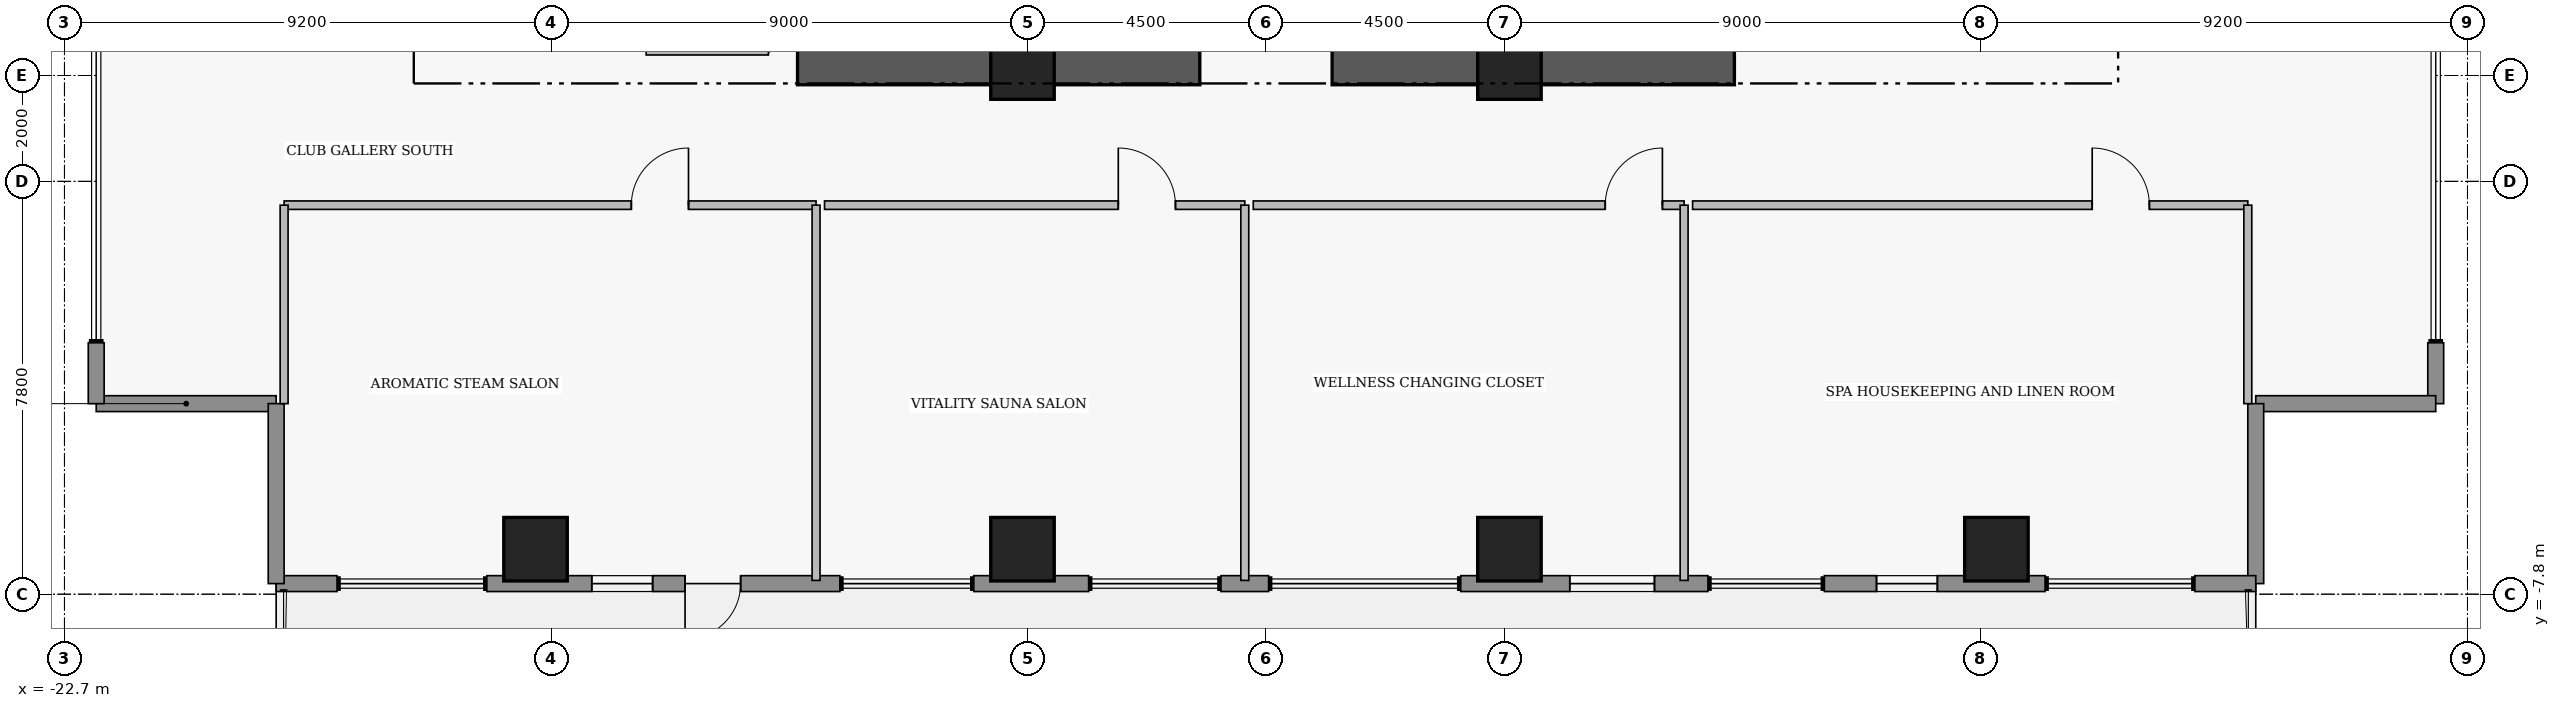
"""IFC4 building model, lengths in metres.
Left out: names, types, materials, properties, quantities, classifications, styles, units other than length and angle.
Written with IfcOpenShell. Run it as: python <this file> out.ifc"""

import sys

from ifc_helpers import new_model, si_unit, direction, frame, frame_2d, origin, origin_2d, place, context, subcontext, project, spatial, rectangle, extrude, element, fill, save


model = new_model("IFC4")
c1 = context("Model", 3, precision=1e-05, world=origin(), true_north=direction((0.0, 1.0)))
c2 = subcontext(c1, "Body", "Model", "MODEL_VIEW")
j1 = project(units=[si_unit("LENGTHUNIT", "METRE"), si_unit("PLANEANGLEUNIT", "RADIAN")], contexts=[c1])
p1 = place(None, origin())
s1 = spatial("IfcSite", under=j1, at=p1, CompositionType="ELEMENT")
p2 = place(p1, origin())
s2 = spatial("IfcBuilding", under=s1, at=p2, CompositionType="ELEMENT")
p3 = place(p2, frame((0.0, 0.0, 172.8)))
s3 = spatial("IfcBuildingStorey", under=s2, at=p3, CompositionType="ELEMENT", Elevation=172.8)
for number, where, z_axis, x_axis in (
    (1, (-8.85, 2.15, 0.0), (0.0, 0.0, 1.0), (1.0, 0.0, 0.0)),
    (2, (1.25, 2.15, 0.0), (0.0, 0.0, 1.0), (1.0, 0.0, 0.0)),
):
    element("IfcWall", number, at=place(p3, frame(where, z_axis=z_axis, x_axis=x_axis)), inside=s3, PredefinedType="SHEAR", context=c2, shape_type="SweptSolid", body=[
        extrude(rectangle(XDim=7.6, YDim=0.65, at=frame_2d((3.8, 0.0))), origin(), (0.0, 0.0, 1.0), 4.38),
    ])
for number, where, z_axis, x_axis in (
    (3, (-4.6, 2.15, 0.0), (0.0, 0.0, 1.0), (1.0, 0.0, 0.0)),
    (4, (4.6, 2.15, 0.0), (0.0, 0.0, 1.0), (1.0, 0.0, 0.0)),
    (5, (-13.8, -6.95, 0.0), (0.0, 0.0, 1.0), (1.0, 0.0, 0.0)),
    (6, (-4.6, -6.95, 0.0), (0.0, 0.0, 1.0), (1.0, 0.0, 0.0)),
    (7, (4.6, -6.95, 0.0), (0.0, 0.0, 1.0), (1.0, 0.0, 0.0)),
    (8, (13.8, -6.95, 0.0), (0.0, 0.0, 1.0), (1.0, 0.0, 0.0)),
):
    element("IfcColumn", number, at=place(p3, frame(where, z_axis=z_axis, x_axis=x_axis)), inside=s3, PredefinedType="COLUMN", context=c2, shape_type="SweptSolid", body=[
        extrude(rectangle(XDim=1.2, YDim=1.2, at=origin_2d()), origin(), (0.0, 0.0, 1.0), 4.6),
    ])
p4 = place(p3, frame((-18.7, -4.2, 0.0), z_axis=(0.0, 0.0, 1.0), x_axis=(-1.0, 0.0, 0.0)))
e9 = element("IfcWall", 9, at=p4, inside=s3, PredefinedType="STANDARD", context=c2, shape_type="SweptSolid", body=[
    extrude(rectangle(XDim=3.4, YDim=0.3, at=frame_2d((1.7, 0.0))), origin(), (0.0, 0.0, 1.0), 4.38),
])
for number, where, z_axis, x_axis in (
    (10, (-22.1, -4.2, 0.0), (0.0, 0.0, 1.0), (0.0, 1.0, 0.0)),
    (11, (22.1, -3.05, 0.0), (0.0, 0.0, 1.0), (0.0, -1.0, 0.0)),
):
    element("IfcWall", number, at=place(p3, frame(where, z_axis=z_axis, x_axis=x_axis)), inside=s3, PredefinedType="STANDARD", context=c2, shape_type="SweptSolid", body=[
        extrude(rectangle(XDim=1.15, YDim=0.3, at=frame_2d((0.575, 0.0))), origin(), (0.0, 0.0, 1.0), 4.38),
    ])
for number, where, z_axis, x_axis in (
    (12, (22.1, -4.2, 0.0), (0.0, 0.0, 1.0), (-1.0, 0.0, 0.0)),
    (13, (18.7, -4.2, 0.0), (0.0, 0.0, 1.0), (0.0, -1.0, 0.0)),
):
    element("IfcWall", number, at=place(p3, frame(where, z_axis=z_axis, x_axis=x_axis)), inside=s3, PredefinedType="STANDARD", context=c2, shape_type="SweptSolid", body=[
        extrude(rectangle(XDim=3.4, YDim=0.3, at=frame_2d((1.7, 0.0))), origin(), (0.0, 0.0, 1.0), 4.38),
    ])
p5 = place(p3, frame((18.7, -7.6, 0.0), z_axis=(0.0, 0.0, 1.0), x_axis=(-1.0, 0.0, 0.0)))
e14 = element("IfcWall", 14, at=p5, inside=s3, PredefinedType="STANDARD", context=c2, shape_type="SweptSolid", body=[
    extrude(rectangle(XDim=1.15, YDim=0.3, at=frame_2d((0.575, 0.0))), origin(), (0.0, 0.0, 1.0), 4.38),
])
p6 = place(p3, frame((14.72, -7.6, 0.0), z_axis=(0.0, 0.0, 1.0), x_axis=(-1.0, 0.0, 0.0)))
e15 = element("IfcWall", 15, at=p6, inside=s3, PredefinedType="STANDARD", context=c2, shape_type="SweptSolid", body=[
    extrude(rectangle(XDim=4.17, YDim=0.3, at=frame_2d((2.085, 0.0))), origin(), (0.0, 0.0, 1.0), 4.38),
])
p7 = place(p6, frame((2.035, 0.0, 0.95)))
e16 = element("IfcOpeningElement", 16, at=p7, cuts=e15, PredefinedType="OPENING", context=c2, shape_type="SweptSolid", body=[
    extrude(rectangle(XDim=1.15, YDim=1.55, at=frame_2d((0.575, 0.775))), frame((0.0, 0.16, 0.0), z_axis=(0.0, -1.0, 0.0), x_axis=(1.0, 0.0, 0.0)), (0.0, 0.0, 1.0), 0.32),
])
p8 = place(p3, frame((8.35, -7.6, 0.0), z_axis=(0.0, 0.0, 1.0), x_axis=(-1.0, 0.0, 0.0)))
e17 = element("IfcWall", 17, at=p8, inside=s3, PredefinedType="STANDARD", context=c2, shape_type="SweptSolid", body=[
    extrude(rectangle(XDim=4.67, YDim=0.3, at=frame_2d((2.335, 0.0))), origin(), (0.0, 0.0, 1.0), 4.38),
])
p9 = place(p8, frame((1.01, 0.0, 0.85)))
e18 = element("IfcOpeningElement", 18, at=p9, cuts=e17, PredefinedType="OPENING", context=c2, shape_type="SweptSolid", body=[
    extrude(rectangle(XDim=1.6, YDim=1.8, at=frame_2d((0.8, 0.9))), frame((0.0, 0.16, 0.0), z_axis=(0.0, -1.0, 0.0), x_axis=(1.0, 0.0, 0.0)), (0.0, 0.0, 1.0), 0.32),
])
p10 = place(p3, frame((0.05, -7.6, 0.0), z_axis=(0.0, 0.0, 1.0), x_axis=(-1.0, 0.0, 0.0)))
e19 = element("IfcWall", 19, at=p10, inside=s3, PredefinedType="STANDARD", context=c2, shape_type="SweptSolid", body=[
    extrude(rectangle(XDim=0.9, YDim=0.3, at=frame_2d((0.45, 0.0))), origin(), (0.0, 0.0, 1.0), 4.38),
])
p11 = place(p3, frame((-3.35, -7.6, 0.0), z_axis=(0.0, 0.0, 1.0), x_axis=(-1.0, 0.0, 0.0)))
e20 = element("IfcWall", 20, at=p11, inside=s3, PredefinedType="STANDARD", context=c2, shape_type="SweptSolid", body=[
    extrude(rectangle(XDim=2.17, YDim=0.3, at=frame_2d((1.085, 0.0))), origin(), (0.0, 0.0, 1.0), 4.38),
])
p12 = place(p3, frame((-8.05, -7.6, 0.0), z_axis=(0.0, 0.0, 1.0), x_axis=(-1.0, 0.0, 0.0)))
e21 = element("IfcWall", 21, at=p12, inside=s3, PredefinedType="STANDARD", context=c2, shape_type="SweptSolid", body=[
    extrude(rectangle(XDim=6.67, YDim=0.3, at=frame_2d((3.335, 0.0))), origin(), (0.0, 0.0, 1.0), 4.38),
])
p13 = place(p12, frame((1.875, 0.0, 0.0)))
e22 = element("IfcOpeningElement", 22, at=p13, cuts=e21, PredefinedType="OPENING", context=c2, shape_type="SweptSolid", body=[
    extrude(rectangle(XDim=1.05, YDim=2.2, at=frame_2d((0.525, 1.1))), frame((0.0, 0.16, 0.0), z_axis=(0.0, -1.0, 0.0), x_axis=(1.0, 0.0, 0.0)), (0.0, 0.0, 1.0), 0.32),
])
p14 = place(p12, frame((3.538, 0.0, 0.95)))
e23 = element("IfcOpeningElement", 23, at=p14, cuts=e21, PredefinedType="OPENING", context=c2, shape_type="SweptSolid", body=[
    extrude(rectangle(XDim=1.15, YDim=1.55, at=frame_2d((0.575, 0.775))), frame((0.0, 0.16, 0.0), z_axis=(0.0, -1.0, 0.0), x_axis=(1.0, 0.0, 0.0)), (0.0, 0.0, 1.0), 0.32),
])
p15 = place(p3, frame((-17.55, -7.6, 0.0), z_axis=(0.0, 0.0, 1.0), x_axis=(-1.0, 0.0, 0.0)))
e24 = element("IfcWall", 24, at=p15, inside=s3, PredefinedType="STANDARD", context=c2, shape_type="SweptSolid", body=[
    extrude(rectangle(XDim=1.15, YDim=0.3, at=frame_2d((0.575, 0.0))), origin(), (0.0, 0.0, 1.0), 4.38),
])
p16 = place(p3, frame((-18.7, -7.6, 0.0), z_axis=(0.0, 0.0, 1.0), x_axis=(0.0, 1.0, 0.0)))
e25 = element("IfcWall", 25, at=p16, inside=s3, PredefinedType="STANDARD", context=c2, shape_type="SweptSolid", body=[
    extrude(rectangle(XDim=3.4, YDim=0.3, at=frame_2d((1.7, 0.0))), origin(), (0.0, 0.0, 1.0), 4.38),
])
p17 = place(p3, frame((-18.55, -0.45, 0.0), z_axis=(0.0, 0.0, 1.0), x_axis=(1.0, 0.0, 0.0)))
e26 = element("IfcWall", 26, at=p17, inside=s3, PredefinedType="PARTITIONING", context=c2, shape_type="SweptSolid", body=[
    extrude(rectangle(XDim=10.05, YDim=0.16, at=frame_2d((5.025, 0.0))), origin(), (0.0, 0.0, 1.0), 4.38),
])
p18 = place(p17, frame((6.56, 0.0, 0.0)))
e27 = element("IfcOpeningElement", 27, at=p18, cuts=e26, PredefinedType="OPENING", context=c2, shape_type="SweptSolid", body=[
    extrude(rectangle(XDim=1.08, YDim=2.18, at=frame_2d((0.54, 1.09))), frame((0.0, 0.09, 0.0), z_axis=(0.0, -1.0, 0.0), x_axis=(1.0, 0.0, 0.0)), (0.0, 0.0, 1.0), 0.18),
])
p19 = place(p3, frame((-8.34, -0.45, 0.0), z_axis=(0.0, 0.0, 1.0), x_axis=(1.0, 0.0, 0.0)))
e28 = element("IfcWall", 28, at=p19, inside=s3, PredefinedType="PARTITIONING", context=c2, shape_type="SweptSolid", body=[
    extrude(rectangle(XDim=7.94, YDim=0.16, at=frame_2d((3.97, 0.0))), origin(), (0.0, 0.0, 1.0), 4.38),
])
p20 = place(p19, frame((5.55, 0.0, 0.0)))
e29 = element("IfcOpeningElement", 29, at=p20, cuts=e28, PredefinedType="OPENING", context=c2, shape_type="SweptSolid", body=[
    extrude(rectangle(XDim=1.08, YDim=2.18, at=frame_2d((0.54, 1.09))), frame((0.0, 0.09, 0.0), z_axis=(0.0, -1.0, 0.0), x_axis=(1.0, 0.0, 0.0)), (0.0, 0.0, 1.0), 0.18),
])
p21 = place(p3, frame((-0.24, -0.45, 0.0), z_axis=(0.0, 0.0, 1.0), x_axis=(1.0, 0.0, 0.0)))
e30 = element("IfcWall", 30, at=p21, inside=s3, PredefinedType="PARTITIONING", context=c2, shape_type="SweptSolid", body=[
    extrude(rectangle(XDim=8.14, YDim=0.16, at=frame_2d((4.07, 0.0))), origin(), (0.0, 0.0, 1.0), 4.38),
])
p22 = place(p21, frame((6.65, 0.0, 0.0)))
e31 = element("IfcOpeningElement", 31, at=p22, cuts=e30, PredefinedType="OPENING", context=c2, shape_type="SweptSolid", body=[
    extrude(rectangle(XDim=1.08, YDim=2.18, at=frame_2d((0.54, 1.09))), frame((0.0, 0.09, 0.0), z_axis=(0.0, -1.0, 0.0), x_axis=(1.0, 0.0, 0.0)), (0.0, 0.0, 1.0), 0.18),
])
p23 = place(p3, frame((8.06, -0.45, 0.0), z_axis=(0.0, 0.0, 1.0), x_axis=(1.0, 0.0, 0.0)))
e32 = element("IfcWall", 32, at=p23, inside=s3, PredefinedType="PARTITIONING", context=c2, shape_type="SweptSolid", body=[
    extrude(rectangle(XDim=10.49, YDim=0.16, at=frame_2d((5.245, 0.0))), origin(), (0.0, 0.0, 1.0), 4.38),
])
p24 = place(p23, frame((7.55, 0.0, 0.0)))
e33 = element("IfcOpeningElement", 33, at=p24, cuts=e32, PredefinedType="OPENING", context=c2, shape_type="SweptSolid", body=[
    extrude(rectangle(XDim=1.08, YDim=2.18, at=frame_2d((0.54, 1.09))), frame((0.0, 0.09, 0.0), z_axis=(0.0, -1.0, 0.0), x_axis=(1.0, 0.0, 0.0)), (0.0, 0.0, 1.0), 0.18),
])
p25 = place(p3, frame((-11.71, 2.47, 0.0), z_axis=(0.0, 0.0, 1.0), x_axis=(1.0, 0.0, 0.0)))
e34 = element("IfcWall", 34, at=p25, inside=s3, PredefinedType="PARTITIONING", context=c2, shape_type="SweptSolid", body=[
    extrude(rectangle(XDim=2.31, YDim=0.165, at=frame_2d((1.155, 0.0))), origin(), (0.0, 0.0, 1.0), 3.28),
])
p26 = place(p3, frame((-18.55, -4.2, 0.0), z_axis=(0.0, 0.0, 1.0), x_axis=(0.0, 1.0, 0.0)))
e35 = element("IfcWall", 35, at=p26, inside=s3, PredefinedType="PARTITIONING", context=c2, shape_type="SweptSolid", body=[
    extrude(rectangle(XDim=3.75, YDim=0.15, at=frame_2d((1.875, 0.0))), origin(), (0.0, 0.0, 1.0), 4.38),
])
for number, where, z_axis, x_axis in (
    (36, (-8.5, -7.54, 0.0), (0.0, 0.0, 1.0), (0.0, 1.0, 0.0)),
    (37, (-0.4, -7.54, 0.0), (0.0, 0.0, 1.0), (0.0, 1.0, 0.0)),
    (38, (7.9, -7.54, 0.0), (0.0, 0.0, 1.0), (0.0, 1.0, 0.0)),
):
    element("IfcWall", number, at=place(p3, frame(where, z_axis=z_axis, x_axis=x_axis)), inside=s3, PredefinedType="PARTITIONING", context=c2, shape_type="SweptSolid", body=[
        extrude(rectangle(XDim=7.09, YDim=0.15, at=frame_2d((3.545, 0.0))), origin(), (0.0, 0.0, 1.0), 4.38),
    ])
p27 = place(p3, frame((18.55, -4.2, 0.0), z_axis=(0.0, 0.0, 1.0), x_axis=(0.0, 1.0, 0.0)))
e39 = element("IfcWall", 39, at=p27, inside=s3, PredefinedType="PARTITIONING", context=c2, shape_type="SweptSolid", body=[
    extrude(rectangle(XDim=3.75, YDim=0.15, at=frame_2d((1.875, 0.0))), origin(), (0.0, 0.0, 1.0), 4.38),
])
p28 = place(p7, origin())
e40 = element("IfcWindow", 40, at=p28, inside=s3, PartitioningType="SINGLE_PANEL", PredefinedType="WINDOW", context=c2, shape_type="SweptSolid", body=[
    extrude(rectangle(XDim=1.15, YDim=1.55, at=frame_2d((0.575, 0.775))), frame((0.0, 0.03, 0.0), z_axis=(0.0, -1.0, 0.0), x_axis=(1.0, 0.0, 0.0)), (0.0, 0.0, 1.0), 0.06),
])
fill(e16, e40)
p29 = place(p9, origin())
e41 = element("IfcWindow", 41, at=p29, inside=s3, PartitioningType="SINGLE_PANEL", PredefinedType="WINDOW", context=c2, shape_type="SweptSolid", body=[
    extrude(rectangle(XDim=1.6, YDim=1.8, at=frame_2d((0.8, 0.9))), frame((0.0, 0.03, 0.0), z_axis=(0.0, -1.0, 0.0), x_axis=(1.0, 0.0, 0.0)), (0.0, 0.0, 1.0), 0.06),
])
fill(e18, e41)
p30 = place(p13, origin())
e42 = element("IfcDoor", 42, at=p30, inside=s3, OperationType="SINGLE_SWING_RIGHT", PredefinedType="DOOR", context=c2, shape_type="SweptSolid", body=[
    extrude(rectangle(XDim=1.05, YDim=2.2, at=frame_2d((0.525, 1.1))), frame((0.0, 0.025, 0.0), z_axis=(0.0, -1.0, 0.0), x_axis=(1.0, 0.0, 0.0)), (0.0, 0.0, 1.0), 0.05),
])
fill(e22, e42)
p31 = place(p14, origin())
e43 = element("IfcWindow", 43, at=p31, inside=s3, PartitioningType="SINGLE_PANEL", PredefinedType="WINDOW", context=c2, shape_type="SweptSolid", body=[
    extrude(rectangle(XDim=1.15, YDim=1.55, at=frame_2d((0.575, 0.775))), frame((0.0, 0.03, 0.0), z_axis=(0.0, -1.0, 0.0), x_axis=(1.0, 0.0, 0.0)), (0.0, 0.0, 1.0), 0.06),
])
fill(e23, e43)
p32 = place(p18, origin())
e44 = element("IfcDoor", 44, at=p32, inside=s3, OperationType="SINGLE_SWING_RIGHT", PredefinedType="DOOR", context=c2, shape_type="SweptSolid", body=[
    extrude(rectangle(XDim=1.08, YDim=2.18, at=frame_2d((0.54, 1.09))), frame((0.0, 0.025, 0.0), z_axis=(0.0, -1.0, 0.0), x_axis=(1.0, 0.0, 0.0)), (0.0, 0.0, 1.0), 0.05),
])
fill(e27, e44)
p33 = place(p20, origin())
e45 = element("IfcDoor", 45, at=p33, inside=s3, OperationType="SINGLE_SWING_LEFT", PredefinedType="DOOR", context=c2, shape_type="SweptSolid", body=[
    extrude(rectangle(XDim=1.08, YDim=2.18, at=frame_2d((0.54, 1.09))), frame((0.0, 0.025, 0.0), z_axis=(0.0, -1.0, 0.0), x_axis=(1.0, 0.0, 0.0)), (0.0, 0.0, 1.0), 0.05),
])
fill(e29, e45)
p34 = place(p22, origin())
e46 = element("IfcDoor", 46, at=p34, inside=s3, OperationType="SINGLE_SWING_RIGHT", PredefinedType="DOOR", context=c2, shape_type="SweptSolid", body=[
    extrude(rectangle(XDim=1.08, YDim=2.18, at=frame_2d((0.54, 1.09))), frame((0.0, 0.025, 0.0), z_axis=(0.0, -1.0, 0.0), x_axis=(1.0, 0.0, 0.0)), (0.0, 0.0, 1.0), 0.05),
])
fill(e31, e46)
p35 = place(p24, origin())
e47 = element("IfcDoor", 47, at=p35, inside=s3, OperationType="SINGLE_SWING_LEFT", PredefinedType="DOOR", context=c2, shape_type="SweptSolid", body=[
    extrude(rectangle(XDim=1.08, YDim=2.18, at=frame_2d((0.54, 1.09))), frame((0.0, 0.025, 0.0), z_axis=(0.0, -1.0, 0.0), x_axis=(1.0, 0.0, 0.0)), (0.0, 0.0, 1.0), 0.05),
])
fill(e33, e47)
save(model, sys.argv[1])
